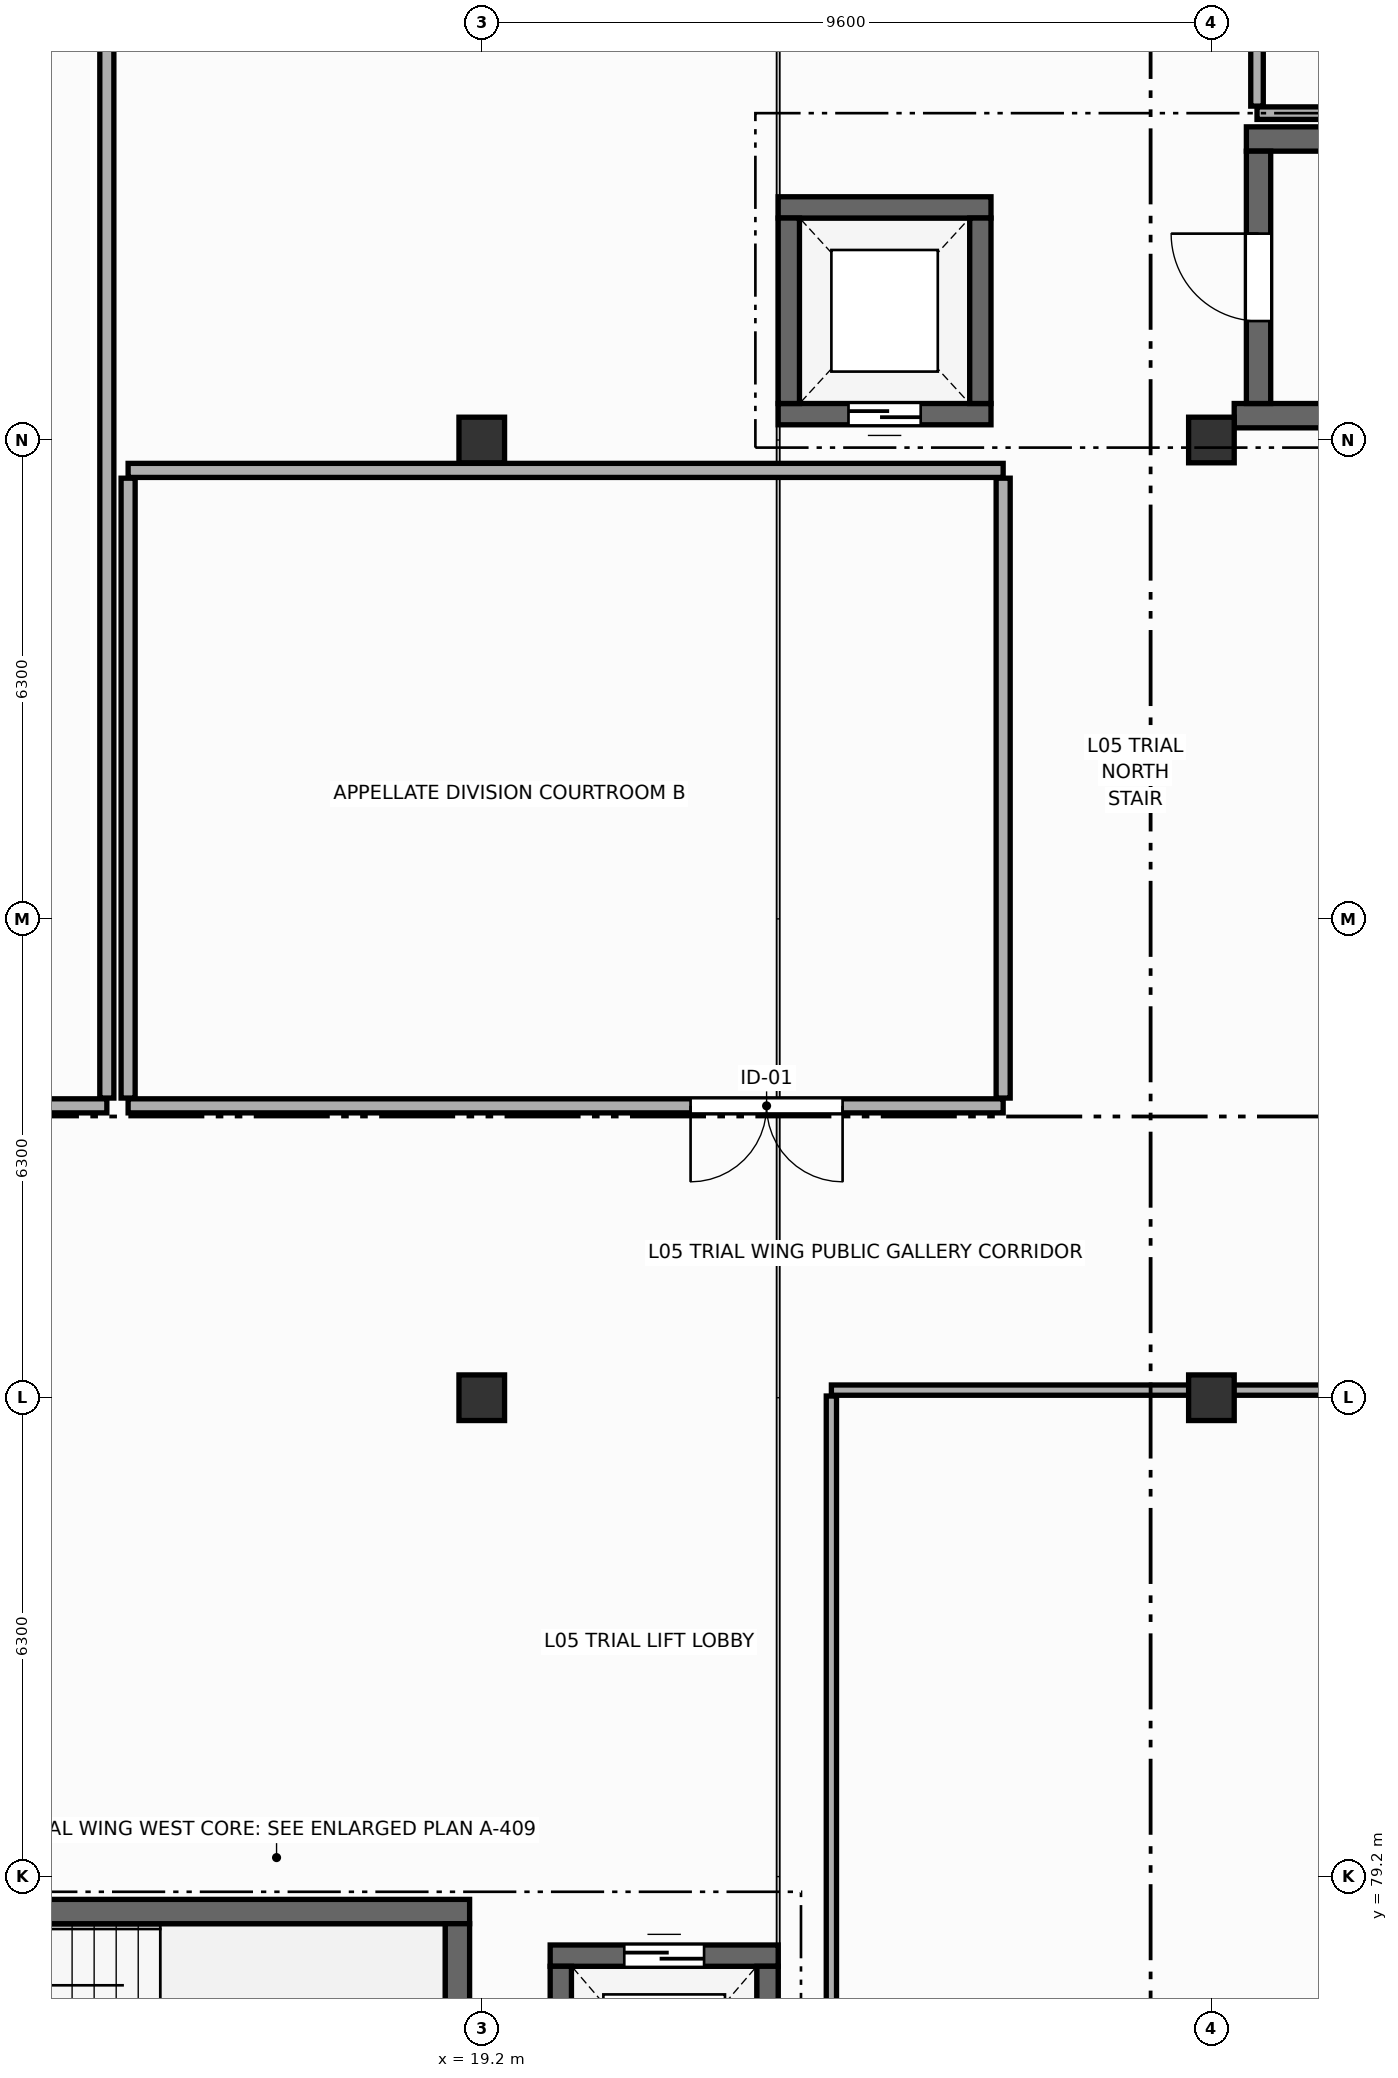
"""IFC4 building model, lengths in metres.
Left out: names, types, materials, properties, quantities, classifications, styles, units other than length and angle.
Written with IfcOpenShell. Run it as: python <this file> out.ifc"""

import sys

from ifc_helpers import new_model, si_unit, direction, frame, frame_2d, origin, origin_2d, place, context, subcontext, project, spatial, rectangle, extrude, element, fill, save


model = new_model("IFC4")
c1 = context("Model", 3, precision=1e-05, world=origin(), true_north=direction((0.0, 1.0)))
c2 = subcontext(c1, "Body", "Model", "MODEL_VIEW")
j1 = project(units=[si_unit("LENGTHUNIT", "METRE"), si_unit("PLANEANGLEUNIT", "RADIAN")], contexts=[c1])
p1 = place(None, origin())
s1 = spatial("IfcSite", under=j1, at=p1, CompositionType="ELEMENT")
p2 = place(p1, origin())
s2 = spatial("IfcBuilding", under=s1, at=p2, CompositionType="ELEMENT")
p3 = place(p2, frame((0.0, 0.0, 18.6)))
s3 = spatial("IfcBuildingStorey", under=s2, at=p3, CompositionType="ELEMENT", Elevation=18.6)
for number, where, z_axis, x_axis in (
    (1, (19.2, 85.5, 0.0), (0.0, 0.0, 1.0), (1.0, 0.0, 0.0)),
    (2, (19.2, 98.1, 0.0), (0.0, 0.0, 1.0), (1.0, 0.0, 0.0)),
    (3, (28.8, 85.5, 0.0), (0.0, 0.0, 1.0), (1.0, 0.0, 0.0)),
    (4, (28.8, 98.1, 0.0), (0.0, 0.0, 1.0), (1.0, 0.0, 0.0)),
):
    element("IfcColumn", number, at=place(p3, frame(where, z_axis=z_axis, x_axis=x_axis)), inside=s3, PredefinedType="COLUMN", context=c2, shape_type="SweptSolid", body=[
        extrude(rectangle(XDim=0.6, YDim=0.6, at=origin_2d()), origin(), (0.0, 0.0, 1.0), 4.2),
    ])
p4 = place(p3, frame((9.86, 78.74, 0.0), z_axis=(0.0, 0.0, 1.0), x_axis=(1.0, 0.0, 0.0)))
e5 = element("IfcWall", 5, at=p4, inside=s3, PredefinedType="SHEAR", context=c2, shape_type="SweptSolid", body=[
    extrude(rectangle(XDim=9.18, YDim=0.32, at=frame_2d((4.59, 0.0))), origin(), (0.0, 0.0, 1.0), 3.96),
])
p5 = place(p3, frame((18.88, 78.58, 0.0), z_axis=(0.0, 0.0, 1.0), x_axis=(0.0, -1.0, 0.0)))
e6 = element("IfcWall", 6, at=p5, inside=s3, PredefinedType="SHEAR", context=c2, shape_type="SweptSolid", body=[
    extrude(rectangle(XDim=3.4, YDim=0.32, at=frame_2d((1.7, 0.0))), origin(), (0.0, 0.0, 1.0), 3.96),
])
p6 = place(p3, frame((29.26, 102.06, 0.0), z_axis=(0.0, 0.0, 1.0), x_axis=(1.0, 0.0, 0.0)))
e7 = element("IfcWall", 7, at=p6, inside=s3, PredefinedType="SHEAR", context=c2, shape_type="SweptSolid", body=[
    extrude(rectangle(XDim=9.18, YDim=0.32, at=frame_2d((4.59, 0.0))), origin(), (0.0, 0.0, 1.0), 3.96),
])
p7 = place(p3, frame((38.44, 98.42, 0.0), z_axis=(0.0, 0.0, 1.0), x_axis=(-1.0, 0.0, 0.0)))
e8 = element("IfcWall", 8, at=p7, inside=s3, PredefinedType="SHEAR", context=c2, shape_type="SweptSolid", body=[
    extrude(rectangle(XDim=9.34, YDim=0.32, at=frame_2d((4.67, 0.0))), origin(), (0.0, 0.0, 1.0), 3.96),
])
p8 = place(p3, frame((29.42, 98.58, 0.0), z_axis=(0.0, 0.0, 1.0), x_axis=(0.0, 1.0, 0.0)))
e9 = element("IfcWall", 9, at=p8, inside=s3, PredefinedType="SHEAR", context=c2, shape_type="SweptSolid", body=[
    extrude(rectangle(XDim=3.32, YDim=0.32, at=frame_2d((1.66, 0.0))), origin(), (0.0, 0.0, 1.0), 3.96),
])
p9 = place(p8, frame((1.085, 0.0, 0.0)))
e10 = element("IfcOpeningElement", 10, at=p9, cuts=e9, PredefinedType="OPENING", context=c2, shape_type="SweptSolid", body=[
    extrude(rectangle(XDim=1.15, YDim=2.2, at=frame_2d((0.575, 1.1))), frame((0.0, 0.17, 0.0), z_axis=(0.0, -1.0, 0.0), x_axis=(1.0, 0.0, 0.0)), (0.0, 0.0, 1.0), 0.34),
])
p10 = place(p3, frame((20.1, 78.16, 0.0), z_axis=(0.0, 0.0, 1.0), x_axis=(1.0, 0.0, 0.0)))
e11 = element("IfcWall", 11, at=p10, inside=s3, PredefinedType="SHEAR", context=c2, shape_type="SweptSolid", body=[
    extrude(rectangle(XDim=3.0, YDim=0.28, at=frame_2d((1.5, 0.0))), origin(), (0.0, 0.0, 1.0), 3.96),
])
p11 = place(p10, frame((0.975, 0.0, 0.0)))
e12 = element("IfcOpeningElement", 12, at=p11, cuts=e11, PredefinedType="OPENING", context=c2, shape_type="SweptSolid", body=[
    extrude(rectangle(XDim=1.05, YDim=2.2, at=frame_2d((0.525, 1.1))), frame((0.0, 0.15, 0.0), z_axis=(0.0, -1.0, 0.0), x_axis=(1.0, 0.0, 0.0)), (0.0, 0.0, 1.0), 0.3),
])
for number, where, z_axis, x_axis in (
    (13, (20.24, 75.18, 0.0), (0.0, 0.0, 1.0), (0.0, 1.0, 0.0)),
    (14, (22.96, 78.02, 0.0), (0.0, 0.0, 1.0), (0.0, -1.0, 0.0)),
):
    element("IfcWall", number, at=place(p3, frame(where, z_axis=z_axis, x_axis=x_axis)), inside=s3, PredefinedType="SHEAR", context=c2, shape_type="SweptSolid", body=[
        extrude(rectangle(XDim=2.84, YDim=0.28, at=frame_2d((1.42, 0.0))), origin(), (0.0, 0.0, 1.0), 3.96),
    ])
p12 = place(p3, frame((23.1, 101.16, 0.0), z_axis=(0.0, 0.0, 1.0), x_axis=(1.0, 0.0, 0.0)))
e15 = element("IfcWall", 15, at=p12, inside=s3, PredefinedType="SHEAR", context=c2, shape_type="SweptSolid", body=[
    extrude(rectangle(XDim=2.8, YDim=0.28, at=frame_2d((1.4, 0.0))), origin(), (0.0, 0.0, 1.0), 3.96),
])
p13 = place(p3, frame((25.9, 98.44, 0.0), z_axis=(0.0, 0.0, 1.0), x_axis=(-1.0, 0.0, 0.0)))
e16 = element("IfcWall", 16, at=p13, inside=s3, PredefinedType="SHEAR", context=c2, shape_type="SweptSolid", body=[
    extrude(rectangle(XDim=2.8, YDim=0.28, at=frame_2d((1.4, 0.0))), origin(), (0.0, 0.0, 1.0), 3.96),
])
p14 = place(p13, frame((0.925, 0.0, 0.0)))
e17 = element("IfcOpeningElement", 17, at=p14, cuts=e16, PredefinedType="OPENING", context=c2, shape_type="SweptSolid", body=[
    extrude(rectangle(XDim=0.95, YDim=2.15, at=frame_2d((0.475, 1.075))), frame((0.0, 0.15, 0.0), z_axis=(0.0, -1.0, 0.0), x_axis=(1.0, 0.0, 0.0)), (0.0, 0.0, 1.0), 0.3),
])
for number, where, z_axis, x_axis in (
    (18, (23.24, 98.58, 0.0), (0.0, 0.0, 1.0), (0.0, 1.0, 0.0)),
    (19, (25.76, 101.02, 0.0), (0.0, 0.0, 1.0), (0.0, -1.0, 0.0)),
):
    element("IfcWall", number, at=place(p3, frame(where, z_axis=z_axis, x_axis=x_axis)), inside=s3, PredefinedType="SHEAR", context=c2, shape_type="SweptSolid", body=[
        extrude(rectangle(XDim=2.44, YDim=0.28, at=frame_2d((1.22, 0.0))), origin(), (0.0, 0.0, 1.0), 3.96),
    ])
p15 = place(p3, frame((14.267, 89.34, 0.0), z_axis=(0.0, 0.0, 1.0), x_axis=(-1.0, 0.0, 0.0)))
e20 = element("IfcWall", 20, at=p15, inside=s3, PredefinedType="PARTITIONING", context=c2, shape_type="SweptSolid", body=[
    extrude(rectangle(XDim=13.813, YDim=0.185, at=frame_2d((6.906, 0.0))), origin(), (0.0, 0.0, 1.0), 3.09),
])
p16 = place(p15, frame((2.017, 0.0, 0.0)))
e21 = element("IfcOpeningElement", 21, at=p16, cuts=e20, PredefinedType="OPENING", context=c2, shape_type="SweptSolid", body=[
    extrude(rectangle(XDim=2.0, YDim=2.5, at=frame_2d((1.0, 1.25))), frame((0.0, 0.103, 0.0), z_axis=(0.0, -1.0, 0.0), x_axis=(1.0, 0.0, 0.0)), (0.0, 0.0, 1.0), 0.205),
])
p17 = place(p3, frame((14.267, 112.346, 0.0), z_axis=(0.0, 0.0, 1.0), x_axis=(0.0, -1.0, 0.0)))
e22 = element("IfcWall", 22, at=p17, inside=s3, PredefinedType="PARTITIONING", context=c2, shape_type="SweptSolid", body=[
    extrude(rectangle(XDim=22.904, YDim=0.185, at=frame_2d((11.452, 0.0))), origin(), (0.0, 0.0, 1.0), 3.29),
])
p18 = place(p3, frame((14.547, 97.7, 0.0), z_axis=(0.0, 0.0, 1.0), x_axis=(1.0, 0.0, 0.0)))
e23 = element("IfcWall", 23, at=p18, inside=s3, PredefinedType="PARTITIONING", context=c2, shape_type="SweptSolid", body=[
    extrude(rectangle(XDim=11.513, YDim=0.185, at=frame_2d((5.756, 0.0))), origin(), (0.0, 0.0, 1.0), 3.04),
])
p19 = place(p3, frame((26.06, 89.34, 0.0), z_axis=(0.0, 0.0, 1.0), x_axis=(-1.0, 0.0, 0.0)))
e24 = element("IfcWall", 24, at=p19, inside=s3, PredefinedType="PARTITIONING", context=c2, shape_type="SweptSolid", body=[
    extrude(rectangle(XDim=11.513, YDim=0.185, at=frame_2d((5.756, 0.0))), origin(), (0.0, 0.0, 1.0), 3.09),
])
p20 = place(p19, frame((2.113, 0.0, 0.0)))
e25 = element("IfcOpeningElement", 25, at=p20, cuts=e24, PredefinedType="OPENING", context=c2, shape_type="SweptSolid", body=[
    extrude(rectangle(XDim=2.0, YDim=2.5, at=frame_2d((1.0, 1.25))), frame((0.0, 0.103, 0.0), z_axis=(0.0, -1.0, 0.0), x_axis=(1.0, 0.0, 0.0)), (0.0, 0.0, 1.0), 0.205),
])
for number, where, z_axis, x_axis in (
    (26, (14.547, 89.442, 0.0), (0.0, 0.0, 1.0), (0.0, 1.0, 0.0)),
    (27, (26.06, 97.597, 0.0), (0.0, 0.0, 1.0), (0.0, -1.0, 0.0)),
):
    element("IfcWall", number, at=place(p3, frame(where, z_axis=z_axis, x_axis=x_axis)), inside=s3, PredefinedType="PARTITIONING", context=c2, shape_type="SweptSolid", body=[
        extrude(rectangle(XDim=8.155, YDim=0.185, at=frame_2d((4.078, 0.0))), origin(), (0.0, 0.0, 1.0), 3.34),
    ])
p21 = place(p3, frame((45.6, 102.4, 0.0), z_axis=(0.0, 0.0, 1.0), x_axis=(-1.0, 0.0, 0.0)))
e28 = element("IfcWall", 28, at=p21, inside=s3, PredefinedType="PARTITIONING", context=c2, shape_type="SweptSolid", body=[
    extrude(rectangle(XDim=16.2, YDim=0.165, at=frame_2d((8.1, 0.0))), origin(), (0.0, 0.0, 1.0), 3.04),
])
p22 = place(p3, frame((29.4, 102.492, 0.0), z_axis=(0.0, 0.0, 1.0), x_axis=(0.0, 1.0, 0.0)))
e29 = element("IfcWall", 29, at=p22, inside=s3, PredefinedType="PARTITIONING", context=c2, shape_type="SweptSolid", body=[
    extrude(rectangle(XDim=9.854, YDim=0.165, at=frame_2d((4.927, 0.0))), origin(), (0.0, 0.0, 1.0), 3.34),
])
p23 = place(p22, frame((1.985, 0.0, 0.0)))
e30 = element("IfcOpeningElement", 30, at=p23, cuts=e29, PredefinedType="OPENING", context=c2, shape_type="SweptSolid", body=[
    extrude(rectangle(XDim=0.98, YDim=2.2, at=frame_2d((0.49, 1.1))), frame((0.0, 0.093, 0.0), z_axis=(0.0, -1.0, 0.0), x_axis=(1.0, 0.0, 0.0)), (0.0, 0.0, 1.0), 0.185),
])
p24 = place(p3, frame((23.8, 85.6, 0.0), z_axis=(0.0, 0.0, 1.0), x_axis=(1.0, 0.0, 0.0)))
e31 = element("IfcWall", 31, at=p24, inside=s3, PredefinedType="PARTITIONING", context=c2, shape_type="SweptSolid", body=[
    extrude(rectangle(XDim=21.8, YDim=0.135, at=frame_2d((10.9, 0.0))), origin(), (0.0, 0.0, 1.0), 3.09),
])
p25 = place(p24, frame((8.41, 0.0, 0.0)))
e32 = element("IfcOpeningElement", 32, at=p25, cuts=e31, PredefinedType="OPENING", context=c2, shape_type="SweptSolid", body=[
    extrude(rectangle(XDim=0.95, YDim=2.15, at=frame_2d((0.475, 1.075))), frame((0.0, 0.077, 0.0), z_axis=(0.0, -1.0, 0.0), x_axis=(1.0, 0.0, 0.0)), (0.0, 0.0, 1.0), 0.155),
])
p26 = place(p3, frame((23.8, 67.654, 0.0), z_axis=(0.0, 0.0, 1.0), x_axis=(0.0, 1.0, 0.0)))
e33 = element("IfcWall", 33, at=p26, inside=s3, PredefinedType="PARTITIONING", context=c2, shape_type="SweptSolid", body=[
    extrude(rectangle(XDim=17.868, YDim=0.135, at=frame_2d((8.934, 0.0))), origin(), (0.0, 0.0, 1.0), 3.29),
])
p27 = place(p9, origin())
e34 = element("IfcDoor", 34, at=p27, inside=s3, OperationType="SINGLE_SWING_RIGHT", PredefinedType="DOOR", context=c2, shape_type="SweptSolid", body=[
    extrude(rectangle(XDim=1.15, YDim=2.2, at=frame_2d((0.575, 1.1))), frame((0.0, 0.025, 0.0), z_axis=(0.0, -1.0, 0.0), x_axis=(1.0, 0.0, 0.0)), (0.0, 0.0, 1.0), 0.05),
])
fill(e10, e34)
p28 = place(p11, origin())
e35 = element("IfcDoor", 35, at=p28, inside=s3, OperationType="DOUBLE_DOOR_SLIDING", PredefinedType="DOOR", context=c2, shape_type="SweptSolid", body=[
    extrude(rectangle(XDim=1.05, YDim=2.2, at=frame_2d((0.525, 1.1))), frame((0.0, 0.025, 0.0), z_axis=(0.0, -1.0, 0.0), x_axis=(1.0, 0.0, 0.0)), (0.0, 0.0, 1.0), 0.05),
])
fill(e12, e35)
p29 = place(p14, origin())
e36 = element("IfcDoor", 36, at=p29, inside=s3, OperationType="DOUBLE_DOOR_SLIDING", PredefinedType="DOOR", context=c2, shape_type="SweptSolid", body=[
    extrude(rectangle(XDim=0.95, YDim=2.15, at=frame_2d((0.475, 1.075))), frame((0.0, 0.025, 0.0), z_axis=(0.0, -1.0, 0.0), x_axis=(1.0, 0.0, 0.0)), (0.0, 0.0, 1.0), 0.05),
])
fill(e17, e36)
p30 = place(p20, origin())
e37 = element("IfcDoor", 37, at=p30, inside=s3, OperationType="DOUBLE_DOOR_SINGLE_SWING", PredefinedType="DOOR", context=c2, shape_type="SweptSolid", body=[
    extrude(rectangle(XDim=2.0, YDim=2.5, at=frame_2d((1.0, 1.25))), frame((0.0, 0.025, 0.0), z_axis=(0.0, -1.0, 0.0), x_axis=(1.0, 0.0, 0.0)), (0.0, 0.0, 1.0), 0.05),
])
fill(e25, e37)
save(model, sys.argv[1])
